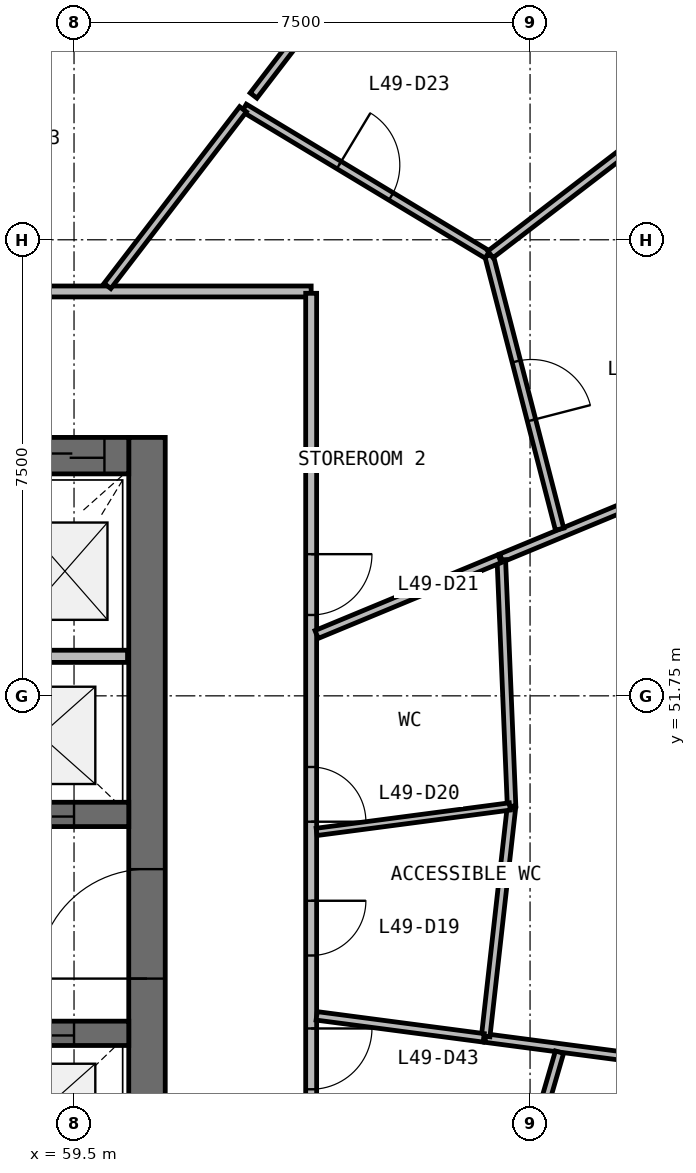
"""IFC4 building model, lengths in metres.
Left out: names, types, materials, properties, quantities, classifications, styles, units other than length and angle.
Written with IfcOpenShell. Run it as: python <this file> out.ifc"""

import sys

from ifc_helpers import new_model, si_unit, direction, frame, frame_2d, origin, place, context, subcontext, project, spatial, rectangle, extrude, source, transform, mapped, element, fill, save


model = new_model("IFC4")
c1 = context("Model", 3, precision=1e-05, world=origin(), true_north=direction((0.0, 1.0)))
c2 = subcontext(c1, "Body", "Model", "MODEL_VIEW")
j1 = project(units=[si_unit("LENGTHUNIT", "METRE"), si_unit("PLANEANGLEUNIT", "RADIAN")], contexts=[c1])
p1 = place(None, origin())
s1 = spatial("IfcSite", under=j1, at=p1, CompositionType="ELEMENT")
p2 = place(p1, origin())
s2 = spatial("IfcBuilding", under=s1, at=p2, CompositionType="ELEMENT")
p3 = place(p2, frame((0.0, 0.0, 203.3)))
s3 = spatial("IfcBuildingStorey", under=s2, at=p3, CompositionType="ELEMENT", Elevation=203.3)
p4 = place(p3, frame((60.7, 40.0, 0.0), z_axis=(0.0, 0.0, 1.0), x_axis=(0.0, 1.0, 0.0)))
e1 = element("IfcWall", 1, at=p4, inside=s3, PredefinedType="SHEAR", context=c2, shape_type="SweptSolid", body=[
    extrude(rectangle(XDim=16.0, YDim=0.6, at=frame_2d((8.0, 0.0))), origin(), (0.0, 0.0, 1.0), 3.9),
])
p5 = place(p4, frame((7.1, 0.0, 0.0)))
e2 = element("IfcOpeningElement", 2, at=p5, cuts=e1, PredefinedType="OPENING", context=c2, shape_type="SweptSolid", body=[
    extrude(rectangle(XDim=1.8, YDim=2.1, at=frame_2d((0.9, 1.05))), frame((0.0, 0.31, 0.0), z_axis=(0.0, -1.0, 0.0), x_axis=(1.0, 0.0, 0.0)), (0.0, 0.0, 1.0), 0.62),
])
p6 = place(p3, frame((60.4, 55.7, 0.0), z_axis=(0.0, 0.0, 1.0), x_axis=(-1.0, 0.0, 0.0)))
e3 = element("IfcWall", 3, at=p6, inside=s3, PredefinedType="SHEAR", context=c2, shape_type="SweptSolid", body=[
    extrude(rectangle(XDim=16.8, YDim=0.6, at=frame_2d((8.4, 0.0))), origin(), (0.0, 0.0, 1.0), 3.9),
])
p7 = place(p6, frame((0.4, 0.0, 0.0)))
e4 = element("IfcOpeningElement", 4, at=p7, cuts=e3, PredefinedType="OPENING", context=c2, shape_type="SweptSolid", body=[
    extrude(rectangle(XDim=1.1, YDim=2.1, at=frame_2d((0.55, 1.05))), frame((0.0, 0.31, 0.0), z_axis=(0.0, -1.0, 0.0), x_axis=(1.0, 0.0, 0.0)), (0.0, 0.0, 1.0), 0.62),
])
p8 = place(p6, frame((10.3, 0.0, 0.0)))
e5 = element("IfcOpeningElement", 5, at=p8, cuts=e3, PredefinedType="OPENING", context=c2, shape_type="SweptSolid", body=[
    extrude(rectangle(XDim=1.2, YDim=2.1, at=frame_2d((0.6, 1.05))), frame((0.0, 0.31, 0.0), z_axis=(0.0, -1.0, 0.0), x_axis=(1.0, 0.0, 0.0)), (0.0, 0.0, 1.0), 0.62),
])
p9 = place(p6, frame((7.25, 0.0, 0.0)))
e6 = element("IfcOpeningElement", 6, at=p9, cuts=e3, PredefinedType="OPENING", context=c2, shape_type="SweptSolid", body=[
    extrude(rectangle(XDim=1.1, YDim=2.1, at=frame_2d((0.55, 1.05))), frame((0.0, 0.31, 0.0), z_axis=(0.0, -1.0, 0.0), x_axis=(1.0, 0.0, 0.0)), (0.0, 0.0, 1.0), 0.62),
])
p10 = place(p3, frame((43.6, 49.8, 0.0), z_axis=(0.0, 0.0, 1.0), x_axis=(1.0, 0.0, 0.0)))
e7 = element("IfcWall", 7, at=p10, inside=s3, PredefinedType="SHEAR", context=c2, shape_type="SweptSolid", body=[
    extrude(rectangle(XDim=16.8, YDim=0.4, at=frame_2d((8.4, 0.0))), origin(), (0.0, 0.0, 1.0), 3.9),
])
p11 = place(p10, frame((9.8, 0.0, 0.0)))
e8 = element("IfcOpeningElement", 8, at=p11, cuts=e7, PredefinedType="OPENING", context=c2, shape_type="SweptSolid", body=[
    extrude(rectangle(XDim=1.1, YDim=2.1, at=frame_2d((0.55, 1.05))), frame((0.0, 0.21, 0.0), z_axis=(0.0, -1.0, 0.0), x_axis=(1.0, 0.0, 0.0)), (0.0, 0.0, 1.0), 0.42),
])
p12 = place(p10, frame((12.3, 0.0, 0.0)))
e9 = element("IfcOpeningElement", 9, at=p12, cuts=e7, PredefinedType="OPENING", context=c2, shape_type="SweptSolid", body=[
    extrude(rectangle(XDim=1.1, YDim=2.1, at=frame_2d((0.55, 1.05))), frame((0.0, 0.21, 0.0), z_axis=(0.0, -1.0, 0.0), x_axis=(1.0, 0.0, 0.0)), (0.0, 0.0, 1.0), 0.42),
])
p13 = place(p10, frame((14.8, 0.0, 0.0)))
e10 = element("IfcOpeningElement", 10, at=p13, cuts=e7, PredefinedType="OPENING", context=c2, shape_type="SweptSolid", body=[
    extrude(rectangle(XDim=1.1, YDim=2.1, at=frame_2d((0.55, 1.05))), frame((0.0, 0.21, 0.0), z_axis=(0.0, -1.0, 0.0), x_axis=(1.0, 0.0, 0.0)), (0.0, 0.0, 1.0), 0.42),
])
p14 = place(p10, frame((3.45, 0.0, 0.0)))
e11 = element("IfcOpeningElement", 11, at=p14, cuts=e7, PredefinedType="OPENING", context=c2, shape_type="SweptSolid", body=[
    extrude(rectangle(XDim=0.9, YDim=2.1, at=frame_2d((0.45, 1.05))), frame((0.0, 0.21, 0.0), z_axis=(0.0, -1.0, 0.0), x_axis=(1.0, 0.0, 0.0)), (0.0, 0.0, 1.0), 0.42),
])
p15 = place(p10, frame((7.85, 0.0, 0.0)))
e12 = element("IfcOpeningElement", 12, at=p15, cuts=e7, PredefinedType="OPENING", context=c2, shape_type="SweptSolid", body=[
    extrude(rectangle(XDim=0.9, YDim=2.1, at=frame_2d((0.45, 1.05))), frame((0.0, 0.21, 0.0), z_axis=(0.0, -1.0, 0.0), x_axis=(1.0, 0.0, 0.0)), (0.0, 0.0, 1.0), 0.42),
])
p16 = place(p3, frame((43.6, 46.2, 0.0), z_axis=(0.0, 0.0, 1.0), x_axis=(1.0, 0.0, 0.0)))
e13 = element("IfcWall", 13, at=p16, inside=s3, PredefinedType="SHEAR", context=c2, shape_type="SweptSolid", body=[
    extrude(rectangle(XDim=16.8, YDim=0.4, at=frame_2d((8.4, 0.0))), origin(), (0.0, 0.0, 1.0), 3.9),
])
p17 = place(p16, frame((9.8, 0.0, 0.0)))
e14 = element("IfcOpeningElement", 14, at=p17, cuts=e13, PredefinedType="OPENING", context=c2, shape_type="SweptSolid", body=[
    extrude(rectangle(XDim=1.1, YDim=2.1, at=frame_2d((0.55, 1.05))), frame((0.0, 0.21, 0.0), z_axis=(0.0, -1.0, 0.0), x_axis=(1.0, 0.0, 0.0)), (0.0, 0.0, 1.0), 0.42),
])
p18 = place(p16, frame((12.3, 0.0, 0.0)))
e15 = element("IfcOpeningElement", 15, at=p18, cuts=e13, PredefinedType="OPENING", context=c2, shape_type="SweptSolid", body=[
    extrude(rectangle(XDim=1.1, YDim=2.1, at=frame_2d((0.55, 1.05))), frame((0.0, 0.21, 0.0), z_axis=(0.0, -1.0, 0.0), x_axis=(1.0, 0.0, 0.0)), (0.0, 0.0, 1.0), 0.42),
])
p19 = place(p16, frame((14.8, 0.0, 0.0)))
e16 = element("IfcOpeningElement", 16, at=p19, cuts=e13, PredefinedType="OPENING", context=c2, shape_type="SweptSolid", body=[
    extrude(rectangle(XDim=1.1, YDim=2.1, at=frame_2d((0.55, 1.05))), frame((0.0, 0.21, 0.0), z_axis=(0.0, -1.0, 0.0), x_axis=(1.0, 0.0, 0.0)), (0.0, 0.0, 1.0), 0.42),
])
p20 = place(p16, frame((2.45, 0.0, 0.0)))
e17 = element("IfcOpeningElement", 17, at=p20, cuts=e13, PredefinedType="OPENING", context=c2, shape_type="SweptSolid", body=[
    extrude(rectangle(XDim=0.9, YDim=2.1, at=frame_2d((0.45, 1.05))), frame((0.0, 0.21, 0.0), z_axis=(0.0, -1.0, 0.0), x_axis=(1.0, 0.0, 0.0)), (0.0, 0.0, 1.0), 0.42),
])
p21 = place(p16, frame((7.85, 0.0, 0.0)))
e18 = element("IfcOpeningElement", 18, at=p21, cuts=e13, PredefinedType="OPENING", context=c2, shape_type="SweptSolid", body=[
    extrude(rectangle(XDim=0.9, YDim=2.1, at=frame_2d((0.45, 1.05))), frame((0.0, 0.21, 0.0), z_axis=(0.0, -1.0, 0.0), x_axis=(1.0, 0.0, 0.0)), (0.0, 0.0, 1.0), 0.42),
])
p22 = place(p3, frame((60.38, 52.4, 0.0), z_axis=(0.0, 0.0, 1.0), x_axis=(-1.0, 0.0, 0.0)))
e19 = element("IfcWall", 19, at=p22, inside=s3, PredefinedType="SOLIDWALL", context=c2, shape_type="SweptSolid", body=[
    extrude(rectangle(XDim=1.85, YDim=0.2, at=frame_2d((0.925, 0.0))), origin(), (0.0, 0.0, 1.0), 3.58),
])
p23 = place(p3, frame((40.6, 58.4, 0.0), z_axis=(0.0, 0.0, 1.0), x_axis=(1.0, 0.0, 0.0)))
e20 = element("IfcWall", 20, at=p23, inside=s3, PredefinedType="PARTITIONING", context=c2, shape_type="SweptSolid", body=[
    extrude(rectangle(XDim=22.8, YDim=0.18, at=frame_2d((11.4, 0.0))), origin(), (0.0, 0.0, 1.0), 2.88),
])
p24 = place(p23, frame((12.95, 0.0, 0.0)))
e21 = element("IfcOpeningElement", 21, at=p24, cuts=e20, PredefinedType="OPENING", context=c2, shape_type="SweptSolid", body=[
    extrude(rectangle(XDim=1.0, YDim=2.1, at=frame_2d((0.5, 1.05))), frame((0.0, 0.1, 0.0), z_axis=(0.0, -1.0, 0.0), x_axis=(1.0, 0.0, 0.0)), (0.0, 0.0, 1.0), 0.2),
])
p25 = place(p23, frame((10.95, 0.0, 0.0)))
e22 = element("IfcOpeningElement", 22, at=p25, cuts=e20, PredefinedType="OPENING", context=c2, shape_type="SweptSolid", body=[
    extrude(rectangle(XDim=1.0, YDim=2.1, at=frame_2d((0.5, 1.05))), frame((0.0, 0.1, 0.0), z_axis=(0.0, -1.0, 0.0), x_axis=(1.0, 0.0, 0.0)), (0.0, 0.0, 1.0), 0.2),
])
p26 = place(p3, frame((63.4, 58.37, 0.0), z_axis=(0.0, 0.0, 1.0), x_axis=(0.0, -1.0, 0.0)))
e23 = element("IfcWall", 23, at=p26, inside=s3, PredefinedType="PARTITIONING", context=c2, shape_type="SweptSolid", body=[
    extrude(rectangle(XDim=20.74, YDim=0.18, at=frame_2d((10.37, 0.0))), origin(), (0.0, 0.0, 1.0), 2.88),
])
p27 = place(p26, frame((9.99, 0.0, 0.0)))
e24 = element("IfcOpeningElement", 24, at=p27, cuts=e23, PredefinedType="OPENING", context=c2, shape_type="SweptSolid", body=[
    extrude(rectangle(XDim=0.9, YDim=2.1, at=frame_2d((0.45, 1.05))), frame((0.0, 0.1, 0.0), z_axis=(0.0, -1.0, 0.0), x_axis=(1.0, 0.0, 0.0)), (0.0, 0.0, 1.0), 0.2),
])
p28 = place(p26, frame((7.79, 0.0, 0.0)))
e25 = element("IfcOpeningElement", 25, at=p28, cuts=e23, PredefinedType="OPENING", context=c2, shape_type="SweptSolid", body=[
    extrude(rectangle(XDim=0.9, YDim=2.1, at=frame_2d((0.45, 1.05))), frame((0.0, 0.1, 0.0), z_axis=(0.0, -1.0, 0.0), x_axis=(1.0, 0.0, 0.0)), (0.0, 0.0, 1.0), 0.2),
])
p29 = place(p26, frame((4.29, 0.0, 0.0)))
e26 = element("IfcOpeningElement", 26, at=p29, cuts=e23, PredefinedType="OPENING", context=c2, shape_type="SweptSolid", body=[
    extrude(rectangle(XDim=1.0, YDim=2.1, at=frame_2d((0.5, 1.05))), frame((0.0, 0.1, 0.0), z_axis=(0.0, -1.0, 0.0), x_axis=(1.0, 0.0, 0.0)), (0.0, 0.0, 1.0), 0.2),
])
p30 = place(p26, frame((15.49, 0.0, 0.0)))
e27 = element("IfcOpeningElement", 27, at=p30, cuts=e23, PredefinedType="OPENING", context=c2, shape_type="SweptSolid", body=[
    extrude(rectangle(XDim=1.0, YDim=2.1, at=frame_2d((0.5, 1.05))), frame((0.0, 0.1, 0.0), z_axis=(0.0, -1.0, 0.0), x_axis=(1.0, 0.0, 0.0)), (0.0, 0.0, 1.0), 0.2),
])
p31 = place(p26, frame((12.09, 0.0, 0.0)))
e28 = element("IfcOpeningElement", 28, at=p31, cuts=e23, PredefinedType="OPENING", context=c2, shape_type="SweptSolid", body=[
    extrude(rectangle(XDim=1.0, YDim=2.1, at=frame_2d((0.5, 1.05))), frame((0.0, 0.1, 0.0), z_axis=(0.0, -1.0, 0.0), x_axis=(1.0, 0.0, 0.0)), (0.0, 0.0, 1.0), 0.2),
])
p32 = place(p3, frame((72.333, 56.422, 0.0), z_axis=(0.0, 0.0, 1.0), x_axis=(-0.92388853292, -0.382661702733, 0.0)))
e29 = element("IfcWall", 29, at=p32, inside=s3, PredefinedType="PARTITIONING", context=c2, shape_type="SweptSolid", body=[
    extrude(rectangle(XDim=6.285, YDim=0.14, at=frame_2d((3.143, 0.0))), origin(), (0.0, 0.0, 1.0), 2.88),
])
p33 = place(p32, frame((2.635, 0.0, 0.0)))
e30 = element("IfcOpeningElement", 30, at=p33, cuts=e29, PredefinedType="OPENING", context=c2, shape_type="SweptSolid", body=[
    extrude(rectangle(XDim=1.0, YDim=2.1, at=frame_2d((0.5, 1.05))), frame((0.0, 0.08, 0.0), z_axis=(0.0, -1.0, 0.0), x_axis=(1.0, 0.0, 0.0)), (0.0, 0.0, 1.0), 0.16),
])
p34 = place(p3, frame((66.267, 46.122, 0.0), z_axis=(0.0, 0.0, 1.0), x_axis=(0.991448195842, -0.130500861923, 0.0)))
e31 = element("IfcWall", 31, at=p34, inside=s3, PredefinedType="PARTITIONING", context=c2, shape_type="SweptSolid", body=[
    extrude(rectangle(XDim=4.905, YDim=0.14, at=frame_2d((2.453, 0.0))), origin(), (0.0, 0.0, 1.0), 2.88),
])
p35 = place(p3, frame((66.324, 58.991, 0.0), z_axis=(0.0, 0.0, 1.0), x_axis=(0.249819251726, -0.968292487561, 0.0)))
e32 = element("IfcWall", 32, at=p35, inside=s3, PredefinedType="PARTITIONING", context=c2, shape_type="SweptSolid", body=[
    extrude(rectangle(XDim=4.649, YDim=0.14, at=frame_2d((2.324, 0.0))), origin(), (0.0, 0.0, 1.0), 2.88),
])
p36 = place(p35, frame((1.799, 0.0, 0.0)))
e33 = element("IfcOpeningElement", 33, at=p36, cuts=e32, PredefinedType="OPENING", context=c2, shape_type="SweptSolid", body=[
    extrude(rectangle(XDim=1.0, YDim=2.1, at=frame_2d((0.5, 1.05))), frame((0.0, 0.08, 0.0), z_axis=(0.0, -1.0, 0.0), x_axis=(1.0, 0.0, 0.0)), (0.0, 0.0, 1.0), 0.16),
])
p37 = place(p3, frame((62.298, 61.42, 0.0), z_axis=(0.0, 0.0, 1.0), x_axis=(0.856310382511, -0.516461546298, 0.0)))
e34 = element("IfcWall", 34, at=p37, inside=s3, PredefinedType="PARTITIONING", context=c2, shape_type="SweptSolid", body=[
    extrude(rectangle(XDim=4.672, YDim=0.14, at=frame_2d((2.336, 0.0))), origin(), (0.0, 0.0, 1.0), 2.88),
])
p38 = place(p37, frame((1.823, 0.0, 0.0)))
e35 = element("IfcOpeningElement", 35, at=p38, cuts=e34, PredefinedType="OPENING", context=c2, shape_type="SweptSolid", body=[
    extrude(rectangle(XDim=1.0, YDim=2.1, at=frame_2d((0.5, 1.05))), frame((0.0, 0.08, 0.0), z_axis=(0.0, -1.0, 0.0), x_axis=(1.0, 0.0, 0.0)), (0.0, 0.0, 1.0), 0.16),
])
p39 = place(p3, frame((66.696, 49.935, 0.0), z_axis=(0.0, 0.0, 1.0), x_axis=(-0.041535399008, 0.999137032959, 0.0)))
e36 = element("IfcWall", 36, at=p39, inside=s3, PredefinedType="PARTITIONING", context=c2, shape_type="SweptSolid", body=[
    extrude(rectangle(XDim=4.056, YDim=0.14, at=frame_2d((2.028, 0.0))), origin(), (0.0, 0.0, 1.0), 2.88),
])
p40 = place(p3, frame((67.484, 45.891, 0.0), z_axis=(0.0, 0.0, 1.0), x_axis=(-0.279262901939, -0.960214679955, 0.0)))
e37 = element("IfcWall", 37, at=p40, inside=s3, PredefinedType="PARTITIONING", context=c2, shape_type="SweptSolid", body=[
    extrude(rectangle(XDim=3.931, YDim=0.14, at=frame_2d((1.965, 0.0))), origin(), (0.0, 0.0, 1.0), 2.88),
])
p41 = place(p40, frame((1.481, 0.0, 0.0)))
e38 = element("IfcOpeningElement", 38, at=p41, cuts=e37, PredefinedType="OPENING", context=c2, shape_type="SweptSolid", body=[
    extrude(rectangle(XDim=1.0, YDim=2.1, at=frame_2d((0.5, 1.05))), frame((0.0, 0.08, 0.0), z_axis=(0.0, -1.0, 0.0), x_axis=(1.0, 0.0, 0.0)), (0.0, 0.0, 1.0), 0.16),
])
p42 = place(p3, frame((66.348, 59.01, 0.0), z_axis=(0.0, 0.0, 1.0), x_axis=(0.793347300472, 0.608769300173, 0.0)))
e39 = element("IfcWall", 39, at=p42, inside=s3, PredefinedType="PARTITIONING", context=c2, shape_type="SweptSolid", body=[
    extrude(rectangle(XDim=3.899, YDim=0.14, at=frame_2d((1.95, 0.0))), origin(), (0.0, 0.0, 1.0), 2.88),
])
p43 = place(p3, frame((66.271, 46.152, 0.0), z_axis=(0.0, 0.0, 1.0), x_axis=(0.111758070994, 0.993735444456, 0.0)))
e40 = element("IfcWall", 40, at=p43, inside=s3, PredefinedType="PARTITIONING", context=c2, shape_type="SweptSolid", body=[
    extrude(rectangle(XDim=3.777, YDim=0.14, at=frame_2d((1.889, 0.0))), origin(), (0.0, 0.0, 1.0), 2.88),
])
p44 = place(p3, frame((60.049, 58.49, 0.0), z_axis=(0.0, 0.0, 1.0), x_axis=(0.60875050296, 0.793361724024, 0.0)))
e41 = element("IfcWall", 41, at=p44, inside=s3, PredefinedType="PARTITIONING", context=c2, shape_type="SweptSolid", body=[
    extrude(rectangle(XDim=3.663, YDim=0.14, at=frame_2d((1.832, 0.0))), origin(), (0.0, 0.0, 1.0), 2.88),
])
p45 = place(p3, frame((62.453, 61.622, 0.0), z_axis=(0.0, 0.0, 1.0), x_axis=(0.608872401912, 0.793268175455, 0.0)))
e42 = element("IfcWall", 42, at=p45, inside=s3, PredefinedType="PARTITIONING", context=c2, shape_type="SweptSolid", body=[
    extrude(rectangle(XDim=1.0, YDim=0.14, at=frame_2d((0.5, 0.0))), origin(), (0.0, 0.0, 1.0), 2.88),
])
p46 = place(p3, frame((63.49, 52.759, 0.0), z_axis=(0.0, 0.0, 1.0), x_axis=(0.923862401464, 0.382724787753, 0.0)))
e43 = element("IfcWall", 43, at=p46, inside=s3, PredefinedType="PARTITIONING", context=c2, shape_type="SweptSolid", body=[
    extrude(rectangle(XDim=3.257, YDim=0.14, at=frame_2d((1.628, 0.0))), origin(), (0.0, 0.0, 1.0), 2.88),
])
p47 = place(p3, frame((63.49, 46.487, 0.0), z_axis=(0.0, 0.0, 1.0), x_axis=(0.991438994906, -0.13057074473, 0.0)))
e44 = element("IfcWall", 44, at=p47, inside=s3, PredefinedType="PARTITIONING", context=c2, shape_type="SweptSolid", body=[
    extrude(rectangle(XDim=2.771, YDim=0.14, at=frame_2d((1.385, 0.0))), origin(), (0.0, 0.0, 1.0), 2.88),
])
p48 = place(p3, frame((63.49, 49.513, 0.0), z_axis=(0.0, 0.0, 1.0), x_axis=(0.991442878973, 0.130541249168, 0.0)))
e45 = element("IfcWall", 45, at=p48, inside=s3, PredefinedType="PARTITIONING", context=c2, shape_type="SweptSolid", body=[
    extrude(rectangle(XDim=3.204, YDim=0.12, at=frame_2d((1.602, 0.0))), origin(), (0.0, 0.0, 1.0), 2.88),
])
m1 = source(origin(), c2, "Body", "SweptSolid", [
    extrude(rectangle(XDim=1.8, YDim=2.1, at=frame_2d((0.9, 1.05))), frame((0.0, 0.025, 0.0), z_axis=(0.0, -1.0, 0.0), x_axis=(1.0, 0.0, 0.0)), (0.0, 0.0, 1.0), 0.05),
])
p49 = place(p5, origin())
e46 = element("IfcDoor", 46, at=p49, inside=s3, OperationType="SINGLE_SWING_LEFT", PredefinedType="DOOR", context=c2, shape_type="MappedRepresentation", body=[
    mapped(m1, transform((0.0, 0.0, 0.0), scale=1.0)),
])
fill(e2, e46)
m2 = source(origin(), c2, "Body", "SweptSolid", [
    extrude(rectangle(XDim=1.1, YDim=2.1, at=frame_2d((0.55, 1.05))), frame((0.0, 0.025, 0.0), z_axis=(0.0, -1.0, 0.0), x_axis=(1.0, 0.0, 0.0)), (0.0, 0.0, 1.0), 0.05),
])
p50 = place(p13, origin())
e47 = element("IfcDoor", 47, at=p50, inside=s3, OperationType="DOUBLE_DOOR_SLIDING", PredefinedType="USERDEFINED", context=c2, shape_type="MappedRepresentation", body=[
    mapped(m2, transform((0.0, 0.0, 0.0), scale=1.0)),
])
fill(e10, e47)
p51 = place(p19, origin())
e48 = element("IfcDoor", 48, at=p51, inside=s3, OperationType="DOUBLE_DOOR_SLIDING", PredefinedType="USERDEFINED", context=c2, shape_type="MappedRepresentation", body=[
    mapped(m2, transform((0.0, 0.0, 0.0), scale=1.0)),
])
fill(e16, e48)
p52 = place(p7, origin())
e49 = element("IfcDoor", 49, at=p52, inside=s3, OperationType="DOUBLE_DOOR_SLIDING", PredefinedType="USERDEFINED", context=c2, shape_type="MappedRepresentation", body=[
    mapped(m2, transform((0.0, 0.0, 0.0), scale=1.0)),
])
fill(e4, e49)
m3 = source(origin(), c2, "Body", "SweptSolid", [
    extrude(rectangle(XDim=0.9, YDim=2.1, at=frame_2d((0.45, 1.05))), frame((0.0, 0.025, 0.0), z_axis=(0.0, -1.0, 0.0), x_axis=(1.0, 0.0, 0.0)), (0.0, 0.0, 1.0), 0.05),
])
p53 = place(p27, origin())
e50 = element("IfcDoor", 50, at=p53, inside=s3, OperationType="SINGLE_SWING_LEFT", PredefinedType="DOOR", context=c2, shape_type="MappedRepresentation", body=[
    mapped(m3, transform((0.0, 0.0, 0.0), scale=1.0)),
])
fill(e24, e50)
p54 = place(p28, origin())
e51 = element("IfcDoor", 51, at=p54, inside=s3, OperationType="SINGLE_SWING_RIGHT", PredefinedType="DOOR", context=c2, shape_type="MappedRepresentation", body=[
    mapped(m3, transform((0.0, 0.0, 0.0), scale=1.0)),
])
fill(e25, e51)
m4 = source(origin(), c2, "Body", "SweptSolid", [
    extrude(rectangle(XDim=1.0, YDim=2.1, at=frame_2d((0.5, 1.05))), frame((0.0, 0.025, 0.0), z_axis=(0.0, -1.0, 0.0), x_axis=(1.0, 0.0, 0.0)), (0.0, 0.0, 1.0), 0.05),
])
p55 = place(p29, origin())
e52 = element("IfcDoor", 52, at=p55, inside=s3, OperationType="SINGLE_SWING_LEFT", PredefinedType="DOOR", context=c2, shape_type="MappedRepresentation", body=[
    mapped(m4, transform((0.0, 0.0, 0.0), scale=1.0)),
])
fill(e26, e52)
p56 = place(p36, origin())
e53 = element("IfcDoor", 53, at=p56, inside=s3, OperationType="SINGLE_SWING_RIGHT", PredefinedType="DOOR", context=c2, shape_type="MappedRepresentation", body=[
    mapped(m4, transform((0.0, 0.0, 0.0), scale=1.0)),
])
fill(e33, e53)
p57 = place(p38, origin())
e54 = element("IfcDoor", 54, at=p57, inside=s3, OperationType="SINGLE_SWING_LEFT", PredefinedType="DOOR", context=c2, shape_type="MappedRepresentation", body=[
    mapped(m4, transform((0.0, 0.0, 0.0), scale=1.0)),
])
fill(e35, e54)
p58 = place(p31, origin())
e55 = element("IfcDoor", 55, at=p58, inside=s3, OperationType="SINGLE_SWING_LEFT", PredefinedType="DOOR", context=c2, shape_type="MappedRepresentation", body=[
    mapped(m4, transform((0.0, 0.0, 0.0), scale=1.0)),
])
fill(e28, e55)
save(model, sys.argv[1])
